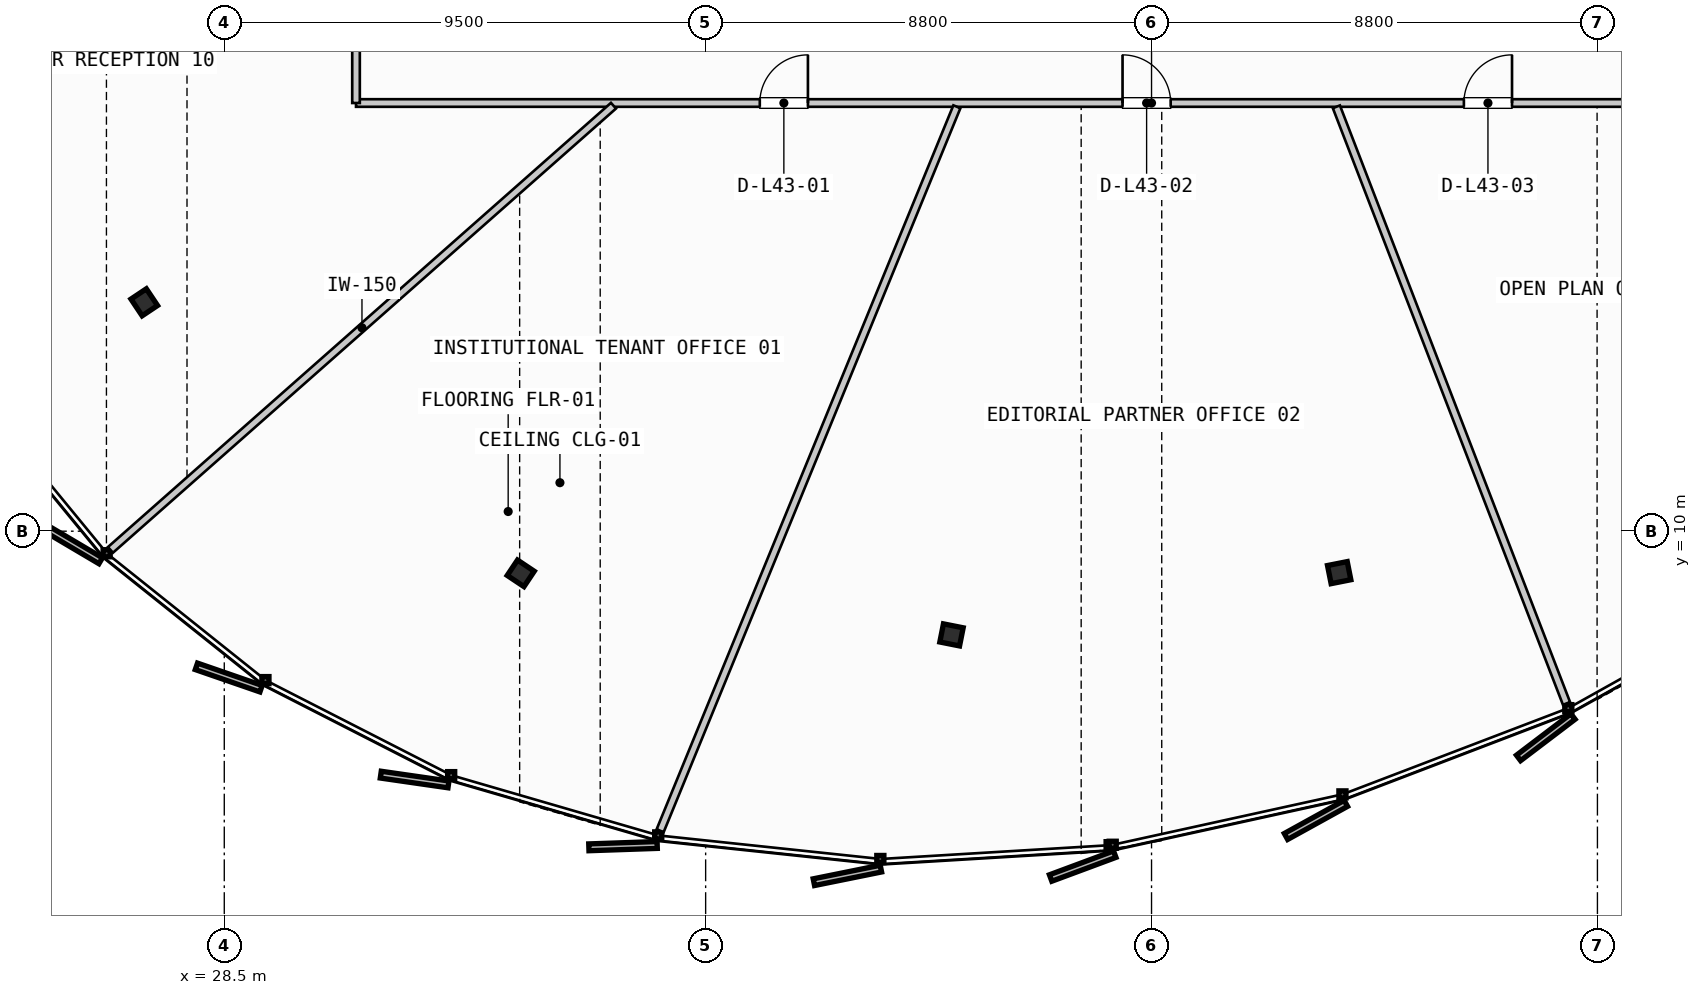
"""IFC4 building model, lengths in metres.
Left out: names, types, materials, properties, quantities, classifications, styles, units other than length and angle.
Written with IfcOpenShell. Run it as: python <this file> out.ifc"""

import sys

from ifc_helpers import new_model, si_unit, direction, frame, frame_2d, origin, origin_2d, place, context, subcontext, project, spatial, rectangle, i_section, extrude, source, transform, mapped, element, fill, save


model = new_model("IFC4")
c1 = context("Model", 3, precision=1e-05, world=origin(), true_north=direction((0.0, 1.0)))
c2 = subcontext(c1, "Body", "Model", "MODEL_VIEW")
j1 = project(units=[si_unit("LENGTHUNIT", "METRE"), si_unit("PLANEANGLEUNIT", "RADIAN")], contexts=[c1])
p1 = place(None, origin())
s1 = spatial("IfcSite", under=j1, at=p1, CompositionType="ELEMENT")
p2 = place(p1, origin())
s2 = spatial("IfcBuilding", under=s1, at=p2, CompositionType="ELEMENT")
p3 = place(p2, frame((0.0, 0.0, 167.85)))
s3 = spatial("IfcBuildingStorey", under=s2, at=p3, CompositionType="ELEMENT", Elevation=167.85)
m1 = source(origin(), c2, "Body", "SweptSolid", [
    extrude(i_section(OverallWidth=0.397, OverallDepth=0.365, WebThickness=0.028, FlangeThickness=0.044, FilletRadius=0.015, at=origin_2d()), origin(), (0.0, 0.0, 1.0), 3.24),
])
for number, where, z_axis, x_axis in (
    (1, (26.921, 14.517, 0.0), (0.0, 0.0, 1.0), (-0.831, -0.556, 0.0)),
    (2, (34.351, 9.168, 0.0), (0.0, 0.0, 1.0), (-0.556, -0.831, 0.0)),
    (3, (42.852, 7.954, 0.0), (0.0, 0.0, 1.0), (-0.195, -0.981, 0.0)),
    (4, (50.503, 9.182, 0.0), (0.0, 0.0, 1.0), (0.195, -0.981, 0.0)),
):
    element("IfcColumn", number, at=place(p3, frame(where, z_axis=z_axis, x_axis=x_axis)), inside=s3, PredefinedType="COLUMN", context=c2, shape_type="MappedRepresentation", body=[
        mapped(m1, transform((0.0, 0.0, 0.0), scale=1.0)),
    ])
p4 = place(p3, frame((31.1, 18.45, 0.0), z_axis=(0.0, 0.0, 1.0), x_axis=(1.0, 0.0, 0.0)))
e5 = element("IfcWall", 5, at=p4, inside=s3, PredefinedType="PARTITIONING", context=c2, shape_type="SweptSolid", body=[
    extrude(rectangle(XDim=31.4, YDim=0.15, at=frame_2d((15.7, 0.0))), origin(), (0.0, 0.0, 1.0), 2.28),
])
p5 = place(p4, frame((7.969, 0.0, 0.0)))
e6 = element("IfcOpeningElement", 6, at=p5, cuts=e5, PredefinedType="OPENING", context=c2, shape_type="SweptSolid", body=[
    extrude(rectangle(XDim=0.95, YDim=2.15, at=frame_2d((0.475, 1.075))), frame((0.0, 0.085, 0.0), z_axis=(0.0, -1.0, 0.0), x_axis=(1.0, 0.0, 0.0)), (0.0, 0.0, 1.0), 0.17),
])
p6 = place(p4, frame((15.128, 0.0, 0.0)))
e7 = element("IfcOpeningElement", 7, at=p6, cuts=e5, PredefinedType="OPENING", context=c2, shape_type="SweptSolid", body=[
    extrude(rectangle(XDim=0.95, YDim=2.15, at=frame_2d((0.475, 1.075))), frame((0.0, 0.085, 0.0), z_axis=(0.0, -1.0, 0.0), x_axis=(1.0, 0.0, 0.0)), (0.0, 0.0, 1.0), 0.17),
])
p7 = place(p4, frame((21.865, 0.0, 0.0)))
e8 = element("IfcOpeningElement", 8, at=p7, cuts=e5, PredefinedType="OPENING", context=c2, shape_type="SweptSolid", body=[
    extrude(rectangle(XDim=0.95, YDim=2.15, at=frame_2d((0.475, 1.075))), frame((0.0, 0.085, 0.0), z_axis=(0.0, -1.0, 0.0), x_axis=(1.0, 0.0, 0.0)), (0.0, 0.0, 1.0), 0.17),
])
p8 = place(p4, frame((27.555, 0.0, 0.0)))
e9 = element("IfcOpeningElement", 9, at=p8, cuts=e5, PredefinedType="OPENING", context=c2, shape_type="SweptSolid", body=[
    extrude(rectangle(XDim=0.95, YDim=2.15, at=frame_2d((0.475, 1.075))), frame((0.0, 0.085, 0.0), z_axis=(0.0, -1.0, 0.0), x_axis=(1.0, 0.0, 0.0)), (0.0, 0.0, 1.0), 0.17),
])
p9 = place(p3, frame((31.1, 20.15, 0.0), z_axis=(0.0, 0.0, 1.0), x_axis=(0.0, -1.0, 0.0)))
e10 = element("IfcWall", 10, at=p9, inside=s3, PredefinedType="PARTITIONING", context=c2, shape_type="SweptSolid", body=[
    extrude(rectangle(XDim=1.7, YDim=0.15, at=frame_2d((0.85, 0.0))), origin(), (0.0, 0.0, 1.0), 2.28),
])
p10 = place(p3, frame((36.181, 18.397, 0.0), z_axis=(0.0, 0.0, 1.0), x_axis=(-0.74960217034, -0.661888650924, 0.0)))
e11 = element("IfcWall", 11, at=p10, inside=s3, PredefinedType="PARTITIONING", context=c2, shape_type="SweptSolid", body=[
    extrude(rectangle(XDim=13.243, YDim=0.15, at=frame_2d((6.622, 0.0))), origin(), (0.0, 0.0, 1.0), 2.28),
])
p11 = place(p3, frame((42.958, 18.376, 0.0), z_axis=(0.0, 0.0, 1.0), x_axis=(-0.379288441988, -0.925278486605, 0.0)))
e12 = element("IfcWall", 12, at=p11, inside=s3, PredefinedType="PARTITIONING", context=c2, shape_type="SweptSolid", body=[
    extrude(rectangle(XDim=15.441, YDim=0.15, at=frame_2d((7.72, 0.0))), origin(), (0.0, 0.0, 1.0), 2.28),
])
p12 = place(p3, frame((50.448, 18.375, 0.0), z_axis=(0.0, 0.0, 1.0), x_axis=(0.359868219022, -0.933003143048, 0.0)))
e13 = element("IfcWall", 13, at=p12, inside=s3, PredefinedType="PARTITIONING", context=c2, shape_type="SweptSolid", body=[
    extrude(rectangle(XDim=12.62, YDim=0.15, at=frame_2d((6.31, 0.0))), origin(), (0.0, 0.0, 1.0), 2.28),
])
m2 = source(origin(), c2, "Body", "SweptSolid", [
    extrude(rectangle(XDim=0.95, YDim=2.15, at=frame_2d((0.475, 1.075))), frame((0.0, 0.025, 0.0), z_axis=(0.0, -1.0, 0.0), x_axis=(1.0, 0.0, 0.0)), (0.0, 0.0, 1.0), 0.05),
])
p13 = place(p5, origin())
e14 = element("IfcDoor", 14, at=p13, inside=s3, OperationType="SINGLE_SWING_RIGHT", PredefinedType="DOOR", context=c2, shape_type="MappedRepresentation", body=[
    mapped(m2, transform((0.0, 0.0, 0.0), scale=1.0)),
])
fill(e6, e14)
p14 = place(p6, origin())
e15 = element("IfcDoor", 15, at=p14, inside=s3, OperationType="SINGLE_SWING_LEFT", PredefinedType="DOOR", context=c2, shape_type="MappedRepresentation", body=[
    mapped(m2, transform((0.0, 0.0, 0.0), scale=1.0)),
])
fill(e7, e15)
p15 = place(p7, origin())
e16 = element("IfcDoor", 16, at=p15, inside=s3, OperationType="SINGLE_SWING_RIGHT", PredefinedType="DOOR", context=c2, shape_type="MappedRepresentation", body=[
    mapped(m2, transform((0.0, 0.0, 0.0), scale=1.0)),
])
fill(e8, e16)
save(model, sys.argv[1])
